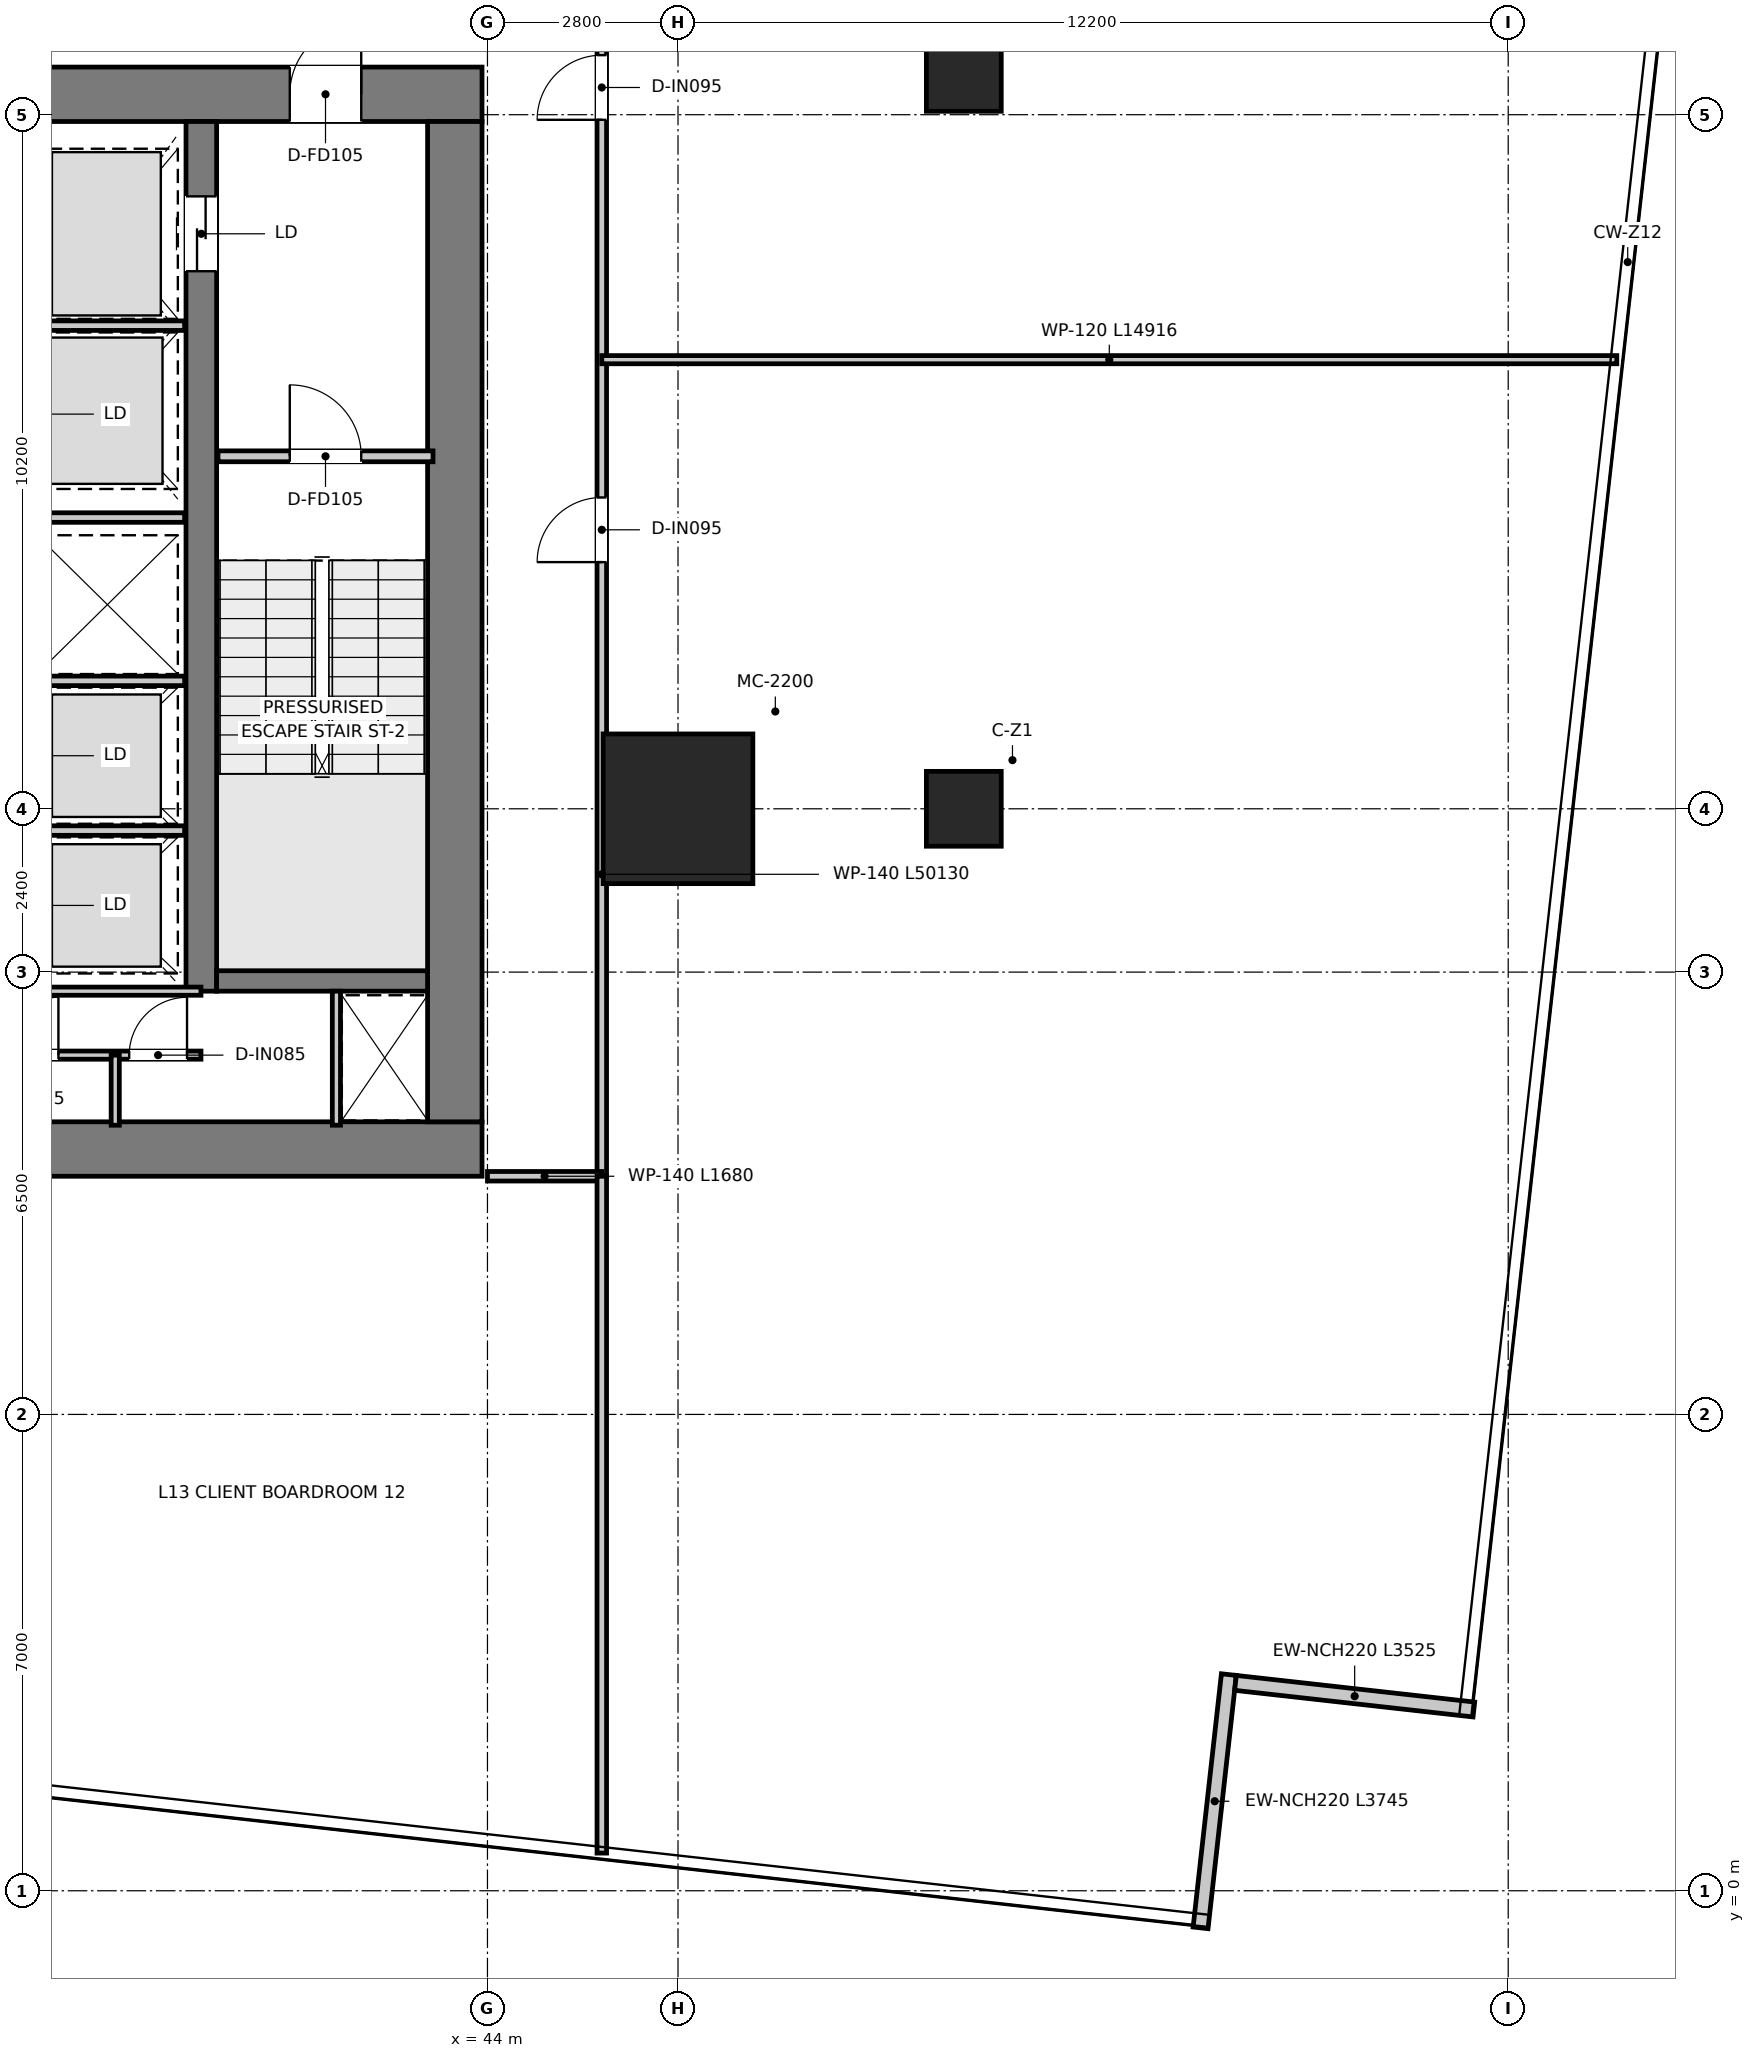
"""IFC4 building model, lengths in metres.
Left out: names, types, materials, properties, quantities, classifications, styles, units other than length and angle.
Written with IfcOpenShell. Run it as: python <this file> out.ifc"""

import sys

from ifc_helpers import new_model, si_unit, direction, frame, frame_2d, origin, origin_2d, place, context, subcontext, project, spatial, rectangle, extrude, source, transform, mapped, element, fill, save


model = new_model("IFC4")
c1 = context("Model", 3, precision=1e-05, world=origin(), true_north=direction((0.0, 1.0)))
c2 = subcontext(c1, "Body", "Model", "MODEL_VIEW")
j1 = project(units=[si_unit("LENGTHUNIT", "METRE"), si_unit("PLANEANGLEUNIT", "RADIAN")], contexts=[c1])
p1 = place(None, origin())
s1 = spatial("IfcSite", under=j1, at=p1, CompositionType="ELEMENT")
p2 = place(p1, origin())
s2 = spatial("IfcBuilding", under=s1, at=p2, CompositionType="ELEMENT")
p3 = place(p2, frame((0.0, 0.0, 56.6)))
s3 = spatial("IfcBuildingStorey", under=s2, at=p3, CompositionType="ELEMENT", Elevation=56.6)
p4 = place(p3, frame((28.08, 10.9, 0.0), z_axis=(0.0, 0.0, 1.0), x_axis=(1.0, 0.0, 0.0)))
e1 = element("IfcWall", 1, at=p4, inside=s3, PredefinedType="SHEAR", context=c2, shape_type="SweptSolid", body=[
    extrude(rectangle(XDim=15.84, YDim=0.8, at=frame_2d((7.92, 0.0))), origin(), (0.0, 0.0, 1.0), 3.95),
])
p5 = place(p3, frame((28.08, 26.4, 0.0), z_axis=(0.0, 0.0, 1.0), x_axis=(1.0, 0.0, 0.0)))
e2 = element("IfcWall", 2, at=p5, inside=s3, PredefinedType="SHEAR", context=c2, shape_type="SweptSolid", body=[
    extrude(rectangle(XDim=15.84, YDim=0.8, at=frame_2d((7.92, 0.0))), origin(), (0.0, 0.0, 1.0), 3.95),
])
p6 = place(p5, frame((7.22, 0.0, 0.0)))
e3 = element("IfcOpeningElement", 3, at=p6, cuts=e2, PredefinedType="OPENING", context=c2, shape_type="SweptSolid", body=[
    extrude(rectangle(XDim=1.4, YDim=2.2, at=frame_2d((0.7, 1.1))), frame((0.0, 0.41, 0.0), z_axis=(0.0, -1.0, 0.0), x_axis=(1.0, 0.0, 0.0)), (0.0, 0.0, 1.0), 0.82),
])
p7 = place(p5, frame((1.775, 0.0, 0.0)))
e4 = element("IfcOpeningElement", 4, at=p7, cuts=e2, PredefinedType="OPENING", context=c2, shape_type="SweptSolid", body=[
    extrude(rectangle(XDim=1.05, YDim=2.1, at=frame_2d((0.525, 1.05))), frame((0.0, 0.41, 0.0), z_axis=(0.0, -1.0, 0.0), x_axis=(1.0, 0.0, 0.0)), (0.0, 0.0, 1.0), 0.82),
])
p8 = place(p5, frame((13.015, 0.0, 0.0)))
e5 = element("IfcOpeningElement", 5, at=p8, cuts=e2, PredefinedType="OPENING", context=c2, shape_type="SweptSolid", body=[
    extrude(rectangle(XDim=1.05, YDim=2.1, at=frame_2d((0.525, 1.05))), frame((0.0, 0.41, 0.0), z_axis=(0.0, -1.0, 0.0), x_axis=(1.0, 0.0, 0.0)), (0.0, 0.0, 1.0), 0.82),
])
p9 = place(p3, frame((43.52, 11.3, 0.0), z_axis=(0.0, 0.0, 1.0), x_axis=(0.0, 1.0, 0.0)))
e6 = element("IfcWall", 6, at=p9, inside=s3, PredefinedType="SHEAR", context=c2, shape_type="SweptSolid", body=[
    extrude(rectangle(XDim=14.7, YDim=0.8, at=frame_2d((7.35, 0.0))), origin(), (0.0, 0.0, 1.0), 3.95),
])
p10 = place(p3, frame((39.795, 13.22, 0.0), z_axis=(0.0, 0.0, 1.0), x_axis=(0.0, 1.0, 0.0)))
e7 = element("IfcWall", 7, at=p10, inside=s3, PredefinedType="SHEAR", context=c2, shape_type="SweptSolid", body=[
    extrude(rectangle(XDim=12.78, YDim=0.45, at=frame_2d((6.39, 0.0))), origin(), (0.0, 0.0, 1.0), 3.95),
])
p11 = place(p10, frame((10.58, 0.0, 0.0)))
e8 = element("IfcOpeningElement", 8, at=p11, cuts=e7, PredefinedType="OPENING", context=c2, shape_type="SweptSolid", body=[
    extrude(rectangle(XDim=1.1, YDim=2.15, at=frame_2d((0.55, 1.075))), frame((0.0, 0.235, 0.0), z_axis=(0.0, -1.0, 0.0), x_axis=(1.0, 0.0, 0.0)), (0.0, 0.0, 1.0), 0.47),
])
p12 = place(p3, frame((40.02, 13.37, 0.0), z_axis=(0.0, 0.0, 1.0), x_axis=(1.0, 0.0, 0.0)))
e9 = element("IfcWall", 9, at=p12, inside=s3, PredefinedType="SHEAR", context=c2, shape_type="SweptSolid", body=[
    extrude(rectangle(XDim=3.1, YDim=0.3, at=frame_2d((1.55, 0.0))), origin(), (0.0, 0.0, 1.0), 3.95),
])
m1 = source(origin(), c2, "Body", "SweptSolid", [
    extrude(rectangle(XDim=2.2, YDim=2.2, at=origin_2d()), origin(), (0.0, 0.0, 1.0), 3.95),
])
p13 = place(p3, frame((46.8, 15.9, 0.0), z_axis=(0.0, 0.0, 1.0), x_axis=(1.0, 0.0, 0.0)))
e10 = element("IfcColumn", 10, at=p13, inside=s3, PredefinedType="USERDEFINED", context=c2, shape_type="MappedRepresentation", body=[
    mapped(m1, transform((0.0, 0.0, 0.0), x_axis=(1.0, 0.0, 0.0), y_axis=(0.0, 1.0, 0.0), z_axis=(0.0, 0.0, 1.0), scale=1.0)),
])
m2 = source(origin(), c2, "Body", "SweptSolid", [
    extrude(rectangle(XDim=1.1, YDim=1.1, at=origin_2d()), origin(), (0.0, 0.0, 1.0), 3.95),
])
for number, where, z_axis, x_axis in (
    (11, (51.0, 26.7, 0.0), (0.0, 0.0, 1.0), (1.0, 0.0, 0.0)),
    (12, (51.0, 15.9, 0.0), (0.0, 0.0, 1.0), (1.0, 0.0, 0.0)),
):
    element("IfcColumn", number, at=place(p3, frame(where, z_axis=z_axis, x_axis=x_axis)), inside=s3, PredefinedType="COLUMN", context=c2, shape_type="MappedRepresentation", body=[
        mapped(m2, transform((0.0, 0.0, 0.0), x_axis=(1.0, 0.0, 0.0), y_axis=(0.0, 1.0, 0.0), z_axis=(0.0, 0.0, 1.0), scale=1.0)),
    ])
p14 = place(p3, frame((54.479, -0.545, 0.0), z_axis=(0.0, 0.0, 1.0), x_axis=(0.111082600583, 0.99381117716, 0.0)))
e13 = element("IfcWall", 13, at=p14, inside=s3, PredefinedType="ELEMENTEDWALL", context=c2, shape_type="SweptSolid", body=[
    extrude(rectangle(XDim=3.745, YDim=0.22, at=frame_2d((1.873, 0.0))), origin(), (0.0, 0.0, 1.0), 3.67),
])
p15 = place(p3, frame((54.992, 3.055, 0.0), z_axis=(0.0, 0.0, 1.0), x_axis=(0.993817675948, -0.111024443135, 0.0)))
e14 = element("IfcWall", 14, at=p15, inside=s3, PredefinedType="ELEMENTEDWALL", context=c2, shape_type="SweptSolid", body=[
    extrude(rectangle(XDim=3.525, YDim=0.22, at=frame_2d((1.762, 0.0))), origin(), (0.0, 0.0, 1.0), 3.67),
])
p16 = place(p3, frame((40.04, 21.08, 0.0), z_axis=(0.0, 0.0, 1.0), x_axis=(1.0, 0.0, 0.0)))
e15 = element("IfcWall", 15, at=p16, inside=s3, PredefinedType="PARTITIONING", context=c2, shape_type="SweptSolid", body=[
    extrude(rectangle(XDim=3.16, YDim=0.16, at=frame_2d((1.58, 0.0))), origin(), (0.0, 0.0, 1.0), 3.67),
])
p17 = place(p16, frame((1.055, 0.0, 0.0)))
e16 = element("IfcOpeningElement", 16, at=p17, cuts=e15, PredefinedType="OPENING", context=c2, shape_type="SweptSolid", body=[
    extrude(rectangle(XDim=1.05, YDim=2.1, at=frame_2d((0.525, 1.05))), frame((0.0, 0.09, 0.0), z_axis=(0.0, -1.0, 0.0), x_axis=(1.0, 0.0, 0.0)), (0.0, 0.0, 1.0), 0.18),
])
p18 = place(p3, frame((37.28, 23.0, 0.0), z_axis=(0.0, 0.0, 1.0), x_axis=(1.0, 0.0, 0.0)))
e17 = element("IfcWall", 17, at=p18, inside=s3, PredefinedType="PARTITIONING", context=c2, shape_type="SweptSolid", body=[
    extrude(rectangle(XDim=2.27, YDim=0.14, at=frame_2d((1.135, 0.0))), origin(), (0.0, 0.0, 1.0), 2.47),
])
for number, where, z_axis, x_axis in (
    (18, (37.28, 17.78, 0.0), (0.0, 0.0, 1.0), (1.0, 0.0, 0.0)),
    (19, (37.28, 20.18, 0.0), (0.0, 0.0, 1.0), (1.0, 0.0, 0.0)),
    (20, (37.28, 15.58, 0.0), (0.0, 0.0, 1.0), (1.0, 0.0, 0.0)),
):
    element("IfcWall", number, at=place(p3, frame(where, z_axis=z_axis, x_axis=x_axis)), inside=s3, PredefinedType="PARTITIONING", context=c2, shape_type="SweptSolid", body=[
        extrude(rectangle(XDim=2.27, YDim=0.14, at=frame_2d((1.135, 0.0))), origin(), (0.0, 0.0, 1.0), 3.67),
    ])
p19 = place(p3, frame((41.78, 11.25, 0.0), z_axis=(0.0, 0.0, 1.0), x_axis=(0.0, 1.0, 0.0)))
e21 = element("IfcWall", 21, at=p19, inside=s3, PredefinedType="PARTITIONING", context=c2, shape_type="SweptSolid", body=[
    extrude(rectangle(XDim=1.97, YDim=0.12, at=frame_2d((0.985, 0.0))), origin(), (0.0, 0.0, 1.0), 3.67),
])
p20 = place(p3, frame((32.21, 13.22, 0.0), z_axis=(0.0, 0.0, 1.0), x_axis=(1.0, 0.0, 0.0)))
e22 = element("IfcWall", 22, at=p20, inside=s3, PredefinedType="PARTITIONING", context=c2, shape_type="SweptSolid", body=[
    extrude(rectangle(XDim=7.58, YDim=0.12, at=frame_2d((3.79, 0.0))), origin(), (0.0, 0.0, 1.0), 3.67),
])
p21 = place(p20, frame((3.365, 0.0, 0.0)))
e23 = element("IfcOpeningElement", 23, at=p21, cuts=e22, PredefinedType="OPENING", context=c2, shape_type="SweptSolid", body=[
    extrude(rectangle(XDim=0.85, YDim=2.1, at=frame_2d((0.425, 1.05))), frame((0.0, 0.07, 0.0), z_axis=(0.0, -1.0, 0.0), x_axis=(1.0, 0.0, 0.0)), (0.0, 0.0, 1.0), 0.14),
])
p22 = place(p3, frame((32.21, 12.28, 0.0), z_axis=(0.0, 0.0, 1.0), x_axis=(1.0, 0.0, 0.0)))
e24 = element("IfcWall", 24, at=p22, inside=s3, PredefinedType="PARTITIONING", context=c2, shape_type="SweptSolid", body=[
    extrude(rectangle(XDim=7.58, YDim=0.12, at=frame_2d((3.79, 0.0))), origin(), (0.0, 0.0, 1.0), 3.67),
])
p23 = place(p22, frame((0.205, 0.0, 0.0)))
e25 = element("IfcOpeningElement", 25, at=p23, cuts=e24, PredefinedType="OPENING", context=c2, shape_type="SweptSolid", body=[
    extrude(rectangle(XDim=0.85, YDim=2.1, at=frame_2d((0.425, 1.05))), frame((0.0, 0.07, 0.0), z_axis=(0.0, -1.0, 0.0), x_axis=(1.0, 0.0, 0.0)), (0.0, 0.0, 1.0), 0.14),
])
p24 = place(p22, frame((2.095, 0.0, 0.0)))
e26 = element("IfcOpeningElement", 26, at=p24, cuts=e24, PredefinedType="OPENING", context=c2, shape_type="SweptSolid", body=[
    extrude(rectangle(XDim=0.85, YDim=2.1, at=frame_2d((0.425, 1.05))), frame((0.0, 0.07, 0.0), z_axis=(0.0, -1.0, 0.0), x_axis=(1.0, 0.0, 0.0)), (0.0, 0.0, 1.0), 0.14),
])
p25 = place(p22, frame((4.635, 0.0, 0.0)))
e27 = element("IfcOpeningElement", 27, at=p25, cuts=e24, PredefinedType="OPENING", context=c2, shape_type="SweptSolid", body=[
    extrude(rectangle(XDim=0.85, YDim=2.1, at=frame_2d((0.425, 1.05))), frame((0.0, 0.07, 0.0), z_axis=(0.0, -1.0, 0.0), x_axis=(1.0, 0.0, 0.0)), (0.0, 0.0, 1.0), 0.14),
])
p26 = place(p22, frame((6.525, 0.0, 0.0)))
e28 = element("IfcOpeningElement", 28, at=p26, cuts=e24, PredefinedType="OPENING", context=c2, shape_type="SweptSolid", body=[
    extrude(rectangle(XDim=0.85, YDim=2.1, at=frame_2d((0.425, 1.05))), frame((0.0, 0.07, 0.0), z_axis=(0.0, -1.0, 0.0), x_axis=(1.0, 0.0, 0.0)), (0.0, 0.0, 1.0), 0.14),
])
p27 = place(p3, frame((38.53, 11.25, 0.0), z_axis=(0.0, 0.0, 1.0), x_axis=(0.0, 1.0, 0.0)))
e29 = element("IfcWall", 29, at=p27, inside=s3, PredefinedType="PARTITIONING", context=c2, shape_type="SweptSolid", body=[
    extrude(rectangle(XDim=1.03, YDim=0.12, at=frame_2d((0.515, 0.0))), origin(), (0.0, 0.0, 1.0), 3.67),
])
p28 = place(p3, frame((45.68, 10.5, 0.0), z_axis=(0.0, 0.0, 1.0), x_axis=(0.0, 1.0, 0.0)))
e30 = element("IfcWall", 30, at=p28, inside=s3, PredefinedType="PARTITIONING", context=c2, shape_type="SweptSolid", body=[
    extrude(rectangle(XDim=25.62, YDim=0.14, at=frame_2d((12.81, 0.0))), origin(), (0.0, 0.0, 1.0), 2.97),
])
p29 = place(p28, frame((9.025, 0.0, 0.0)))
e31 = element("IfcOpeningElement", 31, at=p29, cuts=e30, PredefinedType="OPENING", context=c2, shape_type="SweptSolid", body=[
    extrude(rectangle(XDim=0.95, YDim=2.1, at=frame_2d((0.475, 1.05))), frame((0.0, 0.08, 0.0), z_axis=(0.0, -1.0, 0.0), x_axis=(1.0, 0.0, 0.0)), (0.0, 0.0, 1.0), 0.16),
])
p30 = place(p28, frame((15.525, 0.0, 0.0)))
e32 = element("IfcOpeningElement", 32, at=p30, cuts=e30, PredefinedType="OPENING", context=c2, shape_type="SweptSolid", body=[
    extrude(rectangle(XDim=0.95, YDim=2.1, at=frame_2d((0.475, 1.05))), frame((0.0, 0.08, 0.0), z_axis=(0.0, -1.0, 0.0), x_axis=(1.0, 0.0, 0.0)), (0.0, 0.0, 1.0), 0.16),
])
p31 = place(p28, frame((21.625, 0.0, 0.0)))
e33 = element("IfcOpeningElement", 33, at=p31, cuts=e30, PredefinedType="OPENING", context=c2, shape_type="SweptSolid", body=[
    extrude(rectangle(XDim=0.95, YDim=2.1, at=frame_2d((0.475, 1.05))), frame((0.0, 0.08, 0.0), z_axis=(0.0, -1.0, 0.0), x_axis=(1.0, 0.0, 0.0)), (0.0, 0.0, 1.0), 0.16),
])
p32 = place(p3, frame((44.0, 10.5, 0.0), z_axis=(0.0, 0.0, 1.0), x_axis=(1.0, 0.0, 0.0)))
e34 = element("IfcWall", 34, at=p32, inside=s3, PredefinedType="PARTITIONING", context=c2, shape_type="SweptSolid", body=[
    extrude(rectangle(XDim=1.68, YDim=0.14, at=frame_2d((0.84, 0.0))), origin(), (0.0, 0.0, 1.0), 3.67),
])
p33 = place(p3, frame((45.68, 0.553, 0.0), z_axis=(0.0, 0.0, 1.0), x_axis=(0.0, 1.0, 0.0)))
e35 = element("IfcWall", 35, at=p33, inside=s3, PredefinedType="PARTITIONING", context=c2, shape_type="SweptSolid", body=[
    extrude(rectangle(XDim=9.947, YDim=0.14, at=frame_2d((4.973, 0.0))), origin(), (0.0, 0.0, 1.0), 3.67),
])
p34 = place(p3, frame((45.68, 22.5, 0.0), z_axis=(0.0, 0.0, 1.0), x_axis=(1.0, 0.0, 0.0)))
e36 = element("IfcWall", 36, at=p34, inside=s3, PredefinedType="PARTITIONING", context=c2, shape_type="SweptSolid", body=[
    extrude(rectangle(XDim=14.916, YDim=0.12, at=frame_2d((7.458, 0.0))), origin(), (0.0, 0.0, 1.0), 2.97),
])
p35 = place(p17, origin())
e37 = element("IfcDoor", 37, at=p35, inside=s3, OperationType="SINGLE_SWING_LEFT", PredefinedType="DOOR", context=c2, shape_type="SweptSolid", body=[
    extrude(rectangle(XDim=1.05, YDim=2.1, at=frame_2d((0.525, 1.05))), frame((0.0, 0.025, 0.0), z_axis=(0.0, -1.0, 0.0), x_axis=(1.0, 0.0, 0.0)), (0.0, 0.0, 1.0), 0.05),
])
fill(e16, e37)
p36 = place(p8, origin())
e38 = element("IfcDoor", 38, at=p36, inside=s3, OperationType="SINGLE_SWING_RIGHT", PredefinedType="DOOR", context=c2, shape_type="SweptSolid", body=[
    extrude(rectangle(XDim=1.05, YDim=2.1, at=frame_2d((0.525, 1.05))), frame((0.0, 0.025, 0.0), z_axis=(0.0, -1.0, 0.0), x_axis=(1.0, 0.0, 0.0)), (0.0, 0.0, 1.0), 0.05),
])
fill(e5, e38)
p37 = place(p11, origin())
e39 = element("IfcDoor", 39, at=p37, inside=s3, OperationType="DOUBLE_DOOR_SLIDING", PredefinedType="DOOR", context=c2, shape_type="SweptSolid", body=[
    extrude(rectangle(XDim=1.1, YDim=2.15, at=frame_2d((0.55, 1.075))), frame((0.0, 0.025, 0.0), z_axis=(0.0, -1.0, 0.0), x_axis=(1.0, 0.0, 0.0)), (0.0, 0.0, 1.0), 0.05),
])
fill(e8, e39)
p38 = place(p25, origin())
e40 = element("IfcDoor", 40, at=p38, inside=s3, OperationType="SINGLE_SWING_RIGHT", PredefinedType="DOOR", context=c2, shape_type="SweptSolid", body=[
    extrude(rectangle(XDim=0.85, YDim=2.1, at=frame_2d((0.425, 1.05))), frame((0.0, 0.025, 0.0), z_axis=(0.0, -1.0, 0.0), x_axis=(1.0, 0.0, 0.0)), (0.0, 0.0, 1.0), 0.05),
])
fill(e27, e40)
p39 = place(p26, origin())
e41 = element("IfcDoor", 41, at=p39, inside=s3, OperationType="SINGLE_SWING_RIGHT", PredefinedType="DOOR", context=c2, shape_type="SweptSolid", body=[
    extrude(rectangle(XDim=0.85, YDim=2.1, at=frame_2d((0.425, 1.05))), frame((0.0, 0.025, 0.0), z_axis=(0.0, -1.0, 0.0), x_axis=(1.0, 0.0, 0.0)), (0.0, 0.0, 1.0), 0.05),
])
fill(e28, e41)
p40 = place(p29, origin())
e42 = element("IfcDoor", 42, at=p40, inside=s3, OperationType="SINGLE_SWING_LEFT", PredefinedType="DOOR", context=c2, shape_type="SweptSolid", body=[
    extrude(rectangle(XDim=0.95, YDim=2.1, at=frame_2d((0.475, 1.05))), frame((0.0, 0.025, 0.0), z_axis=(0.0, -1.0, 0.0), x_axis=(1.0, 0.0, 0.0)), (0.0, 0.0, 1.0), 0.05),
])
fill(e31, e42)
p41 = place(p30, origin())
e43 = element("IfcDoor", 43, at=p41, inside=s3, OperationType="SINGLE_SWING_LEFT", PredefinedType="DOOR", context=c2, shape_type="SweptSolid", body=[
    extrude(rectangle(XDim=0.95, YDim=2.1, at=frame_2d((0.475, 1.05))), frame((0.0, 0.025, 0.0), z_axis=(0.0, -1.0, 0.0), x_axis=(1.0, 0.0, 0.0)), (0.0, 0.0, 1.0), 0.05),
])
fill(e32, e43)
save(model, sys.argv[1])
